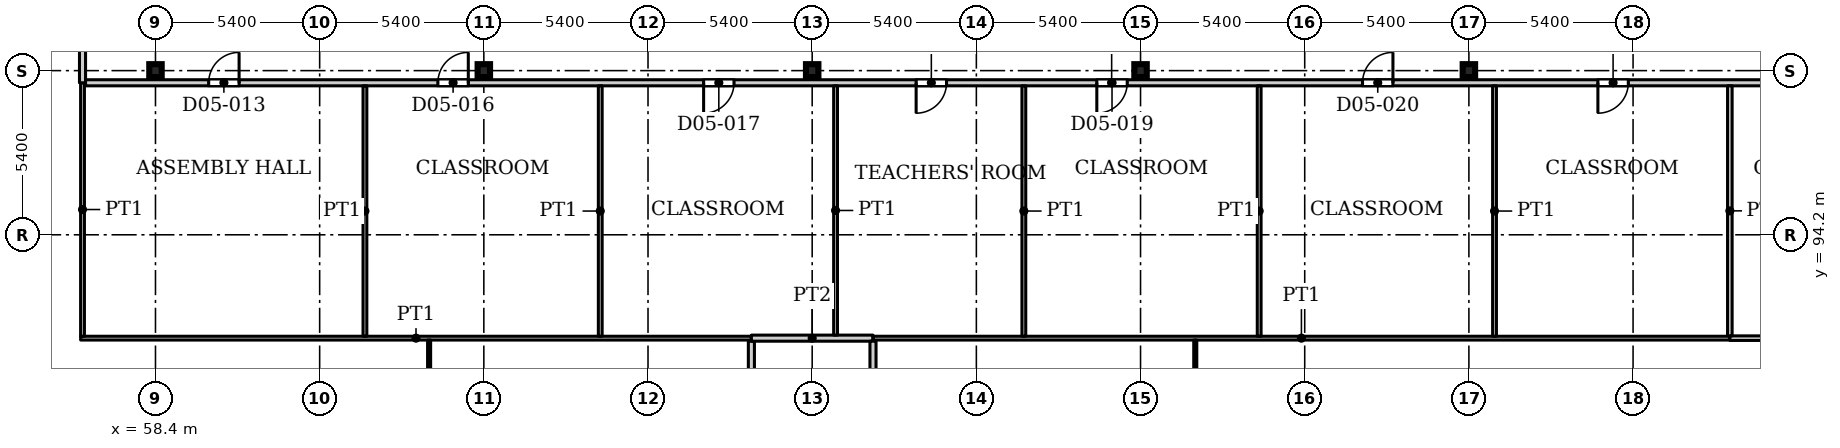
"""IFC4 building model, lengths in metres.
Left out: names, types, materials, properties, quantities, classifications, styles, units other than length and angle.
Written with IfcOpenShell. Run it as: python <this file> out.ifc"""

import sys

from ifc_helpers import new_model, si_unit, direction, frame, frame_2d, origin, origin_2d, place, context, subcontext, project, spatial, rectangle, i_section, extrude, source, transform, mapped, element, fill, save


model = new_model("IFC4")
c1 = context("Model", 3, precision=1e-05, world=origin(), true_north=direction((0.0, 1.0)))
c2 = subcontext(c1, "Body", "Model", "MODEL_VIEW")
j1 = project(units=[si_unit("LENGTHUNIT", "METRE"), si_unit("PLANEANGLEUNIT", "RADIAN")], contexts=[c1])
p1 = place(None, origin())
s1 = spatial("IfcSite", under=j1, at=p1, CompositionType="ELEMENT")
p2 = place(p1, origin())
s2 = spatial("IfcBuilding", under=s1, at=p2, CompositionType="ELEMENT")
p3 = place(p2, frame((0.0, 0.0, 26.0)))
s3 = spatial("IfcBuildingStorey", under=s2, at=p3, CompositionType="ELEMENT", Elevation=26.0)
for number, where, z_axis, x_axis in (
    (1, (58.4, 99.6, 0.0), (0.0, 0.0, 1.0), (1.0, 0.0, 0.0)),
    (2, (69.2, 99.6, 0.0), (0.0, 0.0, 1.0), (1.0, 0.0, 0.0)),
    (3, (80.0, 99.6, 0.0), (0.0, 0.0, 1.0), (1.0, 0.0, 0.0)),
    (4, (90.8, 99.6, 0.0), (0.0, 0.0, 1.0), (1.0, 0.0, 0.0)),
    (5, (101.6, 99.6, 0.0), (0.0, 0.0, 1.0), (1.0, 0.0, 0.0)),
):
    element("IfcColumn", number, at=place(p3, frame(where, z_axis=z_axis, x_axis=x_axis)), inside=s3, PredefinedType="COLUMN", context=c2, shape_type="SweptSolid", body=[
        extrude(i_section(OverallWidth=0.409, OverallDepth=0.425, WebThickness=0.033, FlangeThickness=0.052, FilletRadius=0.013, at=origin_2d()), origin(), (0.0, 0.0, 1.0), 4.5),
    ])
p4 = place(p3, frame((55.938, 90.8, 0.0), z_axis=(0.0, 0.0, 1.0), x_axis=(1.0, 0.0, 0.0)))
e6 = element("IfcWall", 6, at=p4, inside=s3, PredefinedType="PARTITIONING", context=c2, shape_type="SweptSolid", body=[
    extrude(rectangle(XDim=22.062, YDim=0.125, at=frame_2d((11.031, 0.0))), origin(), (0.0, 0.0, 1.0), 4.2),
])
p5 = place(p3, frame((56.0, 90.862, 0.0), z_axis=(0.0, 0.0, 1.0), x_axis=(0.0, 1.0, 0.0)))
e7 = element("IfcWall", 7, at=p5, inside=s3, PredefinedType="PARTITIONING", context=c2, shape_type="SweptSolid", body=[
    extrude(rectangle(XDim=8.338, YDim=0.125, at=frame_2d((4.169, 0.0))), origin(), (0.0, 0.0, 1.0), 4.2),
])
p6 = place(p3, frame((56.0, 99.2, 0.0), z_axis=(0.0, 0.0, 1.0), x_axis=(0.0, 1.0, 0.0)))
e8 = element("IfcWall", 8, at=p6, inside=s3, PredefinedType="PARTITIONING", context=c2, shape_type="SweptSolid", body=[
    extrude(rectangle(XDim=2.4, YDim=0.2, at=frame_2d((1.2, 0.0))), origin(), (0.0, 0.0, 1.0), 4.2),
])
p7 = place(p3, frame((56.1, 99.2, 0.0), z_axis=(0.0, 0.0, 1.0), x_axis=(1.0, 0.0, 0.0)))
e9 = element("IfcWall", 9, at=p7, inside=s3, PredefinedType="PARTITIONING", context=c2, shape_type="SweptSolid", body=[
    extrude(rectangle(XDim=67.5, YDim=0.2, at=frame_2d((33.75, 0.0))), origin(), (0.0, 0.0, 1.0), 4.2),
])
p8 = place(p7, frame((4.05, 0.0, 0.0)))
e10 = element("IfcOpeningElement", 10, at=p8, cuts=e9, PredefinedType="OPENING", context=c2, shape_type="SweptSolid", body=[
    extrude(rectangle(XDim=1.0, YDim=2.1, at=frame_2d((0.5, 1.05))), frame((0.0, 0.11, 0.0), z_axis=(0.0, -1.0, 0.0), x_axis=(1.0, 0.0, 0.0)), (0.0, 0.0, 1.0), 0.22),
])
p9 = place(p7, frame((65.554, 0.0, 0.0)))
e11 = element("IfcOpeningElement", 11, at=p9, cuts=e9, PredefinedType="OPENING", context=c2, shape_type="SweptSolid", body=[
    extrude(rectangle(XDim=1.0, YDim=2.1, at=frame_2d((0.5, 1.05))), frame((0.0, 0.11, 0.0), z_axis=(0.0, -1.0, 0.0), x_axis=(1.0, 0.0, 0.0)), (0.0, 0.0, 1.0), 0.22),
])
p10 = place(p7, frame((11.589, 0.0, 0.0)))
e12 = element("IfcOpeningElement", 12, at=p10, cuts=e9, PredefinedType="OPENING", context=c2, shape_type="SweptSolid", body=[
    extrude(rectangle(XDim=1.0, YDim=2.1, at=frame_2d((0.5, 1.05))), frame((0.0, 0.11, 0.0), z_axis=(0.0, -1.0, 0.0), x_axis=(1.0, 0.0, 0.0)), (0.0, 0.0, 1.0), 0.22),
])
p11 = place(p7, frame((20.329, 0.0, 0.0)))
e13 = element("IfcOpeningElement", 13, at=p11, cuts=e9, PredefinedType="OPENING", context=c2, shape_type="SweptSolid", body=[
    extrude(rectangle(XDim=1.0, YDim=2.1, at=frame_2d((0.5, 1.05))), frame((0.0, 0.11, 0.0), z_axis=(0.0, -1.0, 0.0), x_axis=(1.0, 0.0, 0.0)), (0.0, 0.0, 1.0), 0.22),
])
p12 = place(p7, frame((27.319, 0.0, 0.0)))
e14 = element("IfcOpeningElement", 14, at=p12, cuts=e9, PredefinedType="OPENING", context=c2, shape_type="SweptSolid", body=[
    extrude(rectangle(XDim=1.0, YDim=2.1, at=frame_2d((0.5, 1.05))), frame((0.0, 0.11, 0.0), z_axis=(0.0, -1.0, 0.0), x_axis=(1.0, 0.0, 0.0)), (0.0, 0.0, 1.0), 0.22),
])
p13 = place(p7, frame((33.262, 0.0, 0.0)))
e15 = element("IfcOpeningElement", 15, at=p13, cuts=e9, PredefinedType="OPENING", context=c2, shape_type="SweptSolid", body=[
    extrude(rectangle(XDim=1.0, YDim=2.1, at=frame_2d((0.5, 1.05))), frame((0.0, 0.11, 0.0), z_axis=(0.0, -1.0, 0.0), x_axis=(1.0, 0.0, 0.0)), (0.0, 0.0, 1.0), 0.22),
])
p14 = place(p7, frame((42.002, 0.0, 0.0)))
e16 = element("IfcOpeningElement", 16, at=p14, cuts=e9, PredefinedType="OPENING", context=c2, shape_type="SweptSolid", body=[
    extrude(rectangle(XDim=1.0, YDim=2.1, at=frame_2d((0.5, 1.05))), frame((0.0, 0.11, 0.0), z_axis=(0.0, -1.0, 0.0), x_axis=(1.0, 0.0, 0.0)), (0.0, 0.0, 1.0), 0.22),
])
p15 = place(p7, frame((49.743, 0.0, 0.0)))
e17 = element("IfcOpeningElement", 17, at=p15, cuts=e9, PredefinedType="OPENING", context=c2, shape_type="SweptSolid", body=[
    extrude(rectangle(XDim=1.0, YDim=2.1, at=frame_2d((0.5, 1.05))), frame((0.0, 0.11, 0.0), z_axis=(0.0, -1.0, 0.0), x_axis=(1.0, 0.0, 0.0)), (0.0, 0.0, 1.0), 0.22),
])
p16 = place(p7, frame((56.733, 0.0, 0.0)))
e18 = element("IfcOpeningElement", 18, at=p16, cuts=e9, PredefinedType="OPENING", context=c2, shape_type="SweptSolid", body=[
    extrude(rectangle(XDim=1.0, YDim=2.1, at=frame_2d((0.5, 1.05))), frame((0.0, 0.11, 0.0), z_axis=(0.0, -1.0, 0.0), x_axis=(1.0, 0.0, 0.0)), (0.0, 0.0, 1.0), 0.22),
])
p17 = place(p7, frame((61.394, 0.0, 0.0)))
e19 = element("IfcOpeningElement", 19, at=p17, cuts=e9, PredefinedType="OPENING", context=c2, shape_type="SweptSolid", body=[
    extrude(rectangle(XDim=1.0, YDim=2.1, at=frame_2d((0.5, 1.05))), frame((0.0, 0.11, 0.0), z_axis=(0.0, -1.0, 0.0), x_axis=(1.0, 0.0, 0.0)), (0.0, 0.0, 1.0), 0.22),
])
p18 = place(p3, frame((65.289, 90.862, 0.0), z_axis=(0.0, 0.0, 1.0), x_axis=(0.0, 1.0, 0.0)))
e20 = element("IfcWall", 20, at=p18, inside=s3, PredefinedType="PARTITIONING", context=c2, shape_type="SweptSolid", body=[
    extrude(rectangle(XDim=8.238, YDim=0.125, at=frame_2d((4.119, 0.0))), origin(), (0.0, 0.0, 1.0), 4.2),
])
p19 = place(p3, frame((67.4, 69.0, 0.0), z_axis=(0.0, 0.0, 1.0), x_axis=(0.0, 1.0, 0.0)))
e21 = element("IfcWall", 21, at=p19, inside=s3, PredefinedType="PARTITIONING", context=c2, shape_type="SweptSolid", body=[
    extrude(rectangle(XDim=21.738, YDim=0.1, at=frame_2d((10.869, 0.0))), origin(), (0.0, 0.0, 1.0), 4.2),
])
p20 = place(p3, frame((73.029, 90.862, 0.0), z_axis=(0.0, 0.0, 1.0), x_axis=(0.0, 1.0, 0.0)))
e22 = element("IfcWall", 22, at=p20, inside=s3, PredefinedType="PARTITIONING", context=c2, shape_type="SweptSolid", body=[
    extrude(rectangle(XDim=8.238, YDim=0.125, at=frame_2d((4.119, 0.0))), origin(), (0.0, 0.0, 1.0), 4.2),
])
p21 = place(p3, frame((78.0, 69.1, 0.0), z_axis=(0.0, 0.0, 1.0), x_axis=(0.0, 1.0, 0.0)))
e23 = element("IfcWall", 23, at=p21, inside=s3, PredefinedType="PARTITIONING", context=c2, shape_type="SweptSolid", body=[
    extrude(rectangle(XDim=21.6, YDim=0.2, at=frame_2d((10.8, 0.0))), origin(), (0.0, 0.0, 1.0), 4.2),
])
p22 = place(p3, frame((78.0, 90.8, 0.0), z_axis=(0.0, 0.0, 1.0), x_axis=(1.0, 0.0, 0.0)))
e24 = element("IfcWall", 24, at=p22, inside=s3, PredefinedType="PARTITIONING", context=c2, shape_type="SweptSolid", body=[
    extrude(rectangle(XDim=4.0, YDim=0.2, at=frame_2d((2.0, 0.0))), origin(), (0.0, 0.0, 1.0), 4.2),
])
p23 = place(p3, frame((80.769, 90.9, 0.0), z_axis=(0.0, 0.0, 1.0), x_axis=(0.0, 1.0, 0.0)))
e25 = element("IfcWall", 25, at=p23, inside=s3, PredefinedType="PARTITIONING", context=c2, shape_type="SweptSolid", body=[
    extrude(rectangle(XDim=8.2, YDim=0.125, at=frame_2d((4.1, 0.0))), origin(), (0.0, 0.0, 1.0), 4.2),
])
p24 = place(p3, frame((82.0, 69.1, 0.0), z_axis=(0.0, 0.0, 1.0), x_axis=(0.0, 1.0, 0.0)))
e26 = element("IfcWall", 26, at=p24, inside=s3, PredefinedType="PARTITIONING", context=c2, shape_type="SweptSolid", body=[
    extrude(rectangle(XDim=21.6, YDim=0.2, at=frame_2d((10.8, 0.0))), origin(), (0.0, 0.0, 1.0), 4.2),
])
p25 = place(p3, frame((82.0, 90.8, 0.0), z_axis=(0.0, 0.0, 1.0), x_axis=(1.0, 0.0, 0.0)))
e27 = element("IfcWall", 27, at=p25, inside=s3, PredefinedType="PARTITIONING", context=c2, shape_type="SweptSolid", body=[
    extrude(rectangle(XDim=28.183, YDim=0.125, at=frame_2d((14.092, 0.0))), origin(), (0.0, 0.0, 1.0), 4.2),
])
p26 = place(p3, frame((86.962, 90.862, 0.0), z_axis=(0.0, 0.0, 1.0), x_axis=(0.0, 1.0, 0.0)))
e28 = element("IfcWall", 28, at=p26, inside=s3, PredefinedType="PARTITIONING", context=c2, shape_type="SweptSolid", body=[
    extrude(rectangle(XDim=8.238, YDim=0.125, at=frame_2d((4.119, 0.0))), origin(), (0.0, 0.0, 1.0), 4.2),
])
p27 = place(p3, frame((92.6, 69.0, 0.0), z_axis=(0.0, 0.0, 1.0), x_axis=(0.0, 1.0, 0.0)))
e29 = element("IfcWall", 29, at=p27, inside=s3, PredefinedType="PARTITIONING", context=c2, shape_type="SweptSolid", body=[
    extrude(rectangle(XDim=21.738, YDim=0.1, at=frame_2d((10.869, 0.0))), origin(), (0.0, 0.0, 1.0), 4.2),
])
for number, where, z_axis, x_axis in (
    (30, (94.702, 90.862, 0.0), (0.0, 0.0, 1.0), (0.0, 1.0, 0.0)),
    (31, (102.443, 90.862, 0.0), (0.0, 0.0, 1.0), (0.0, 1.0, 0.0)),
):
    element("IfcWall", number, at=place(p3, frame(where, z_axis=z_axis, x_axis=x_axis)), inside=s3, PredefinedType="PARTITIONING", context=c2, shape_type="SweptSolid", body=[
        extrude(rectangle(XDim=8.238, YDim=0.125, at=frame_2d((4.119, 0.0))), origin(), (0.0, 0.0, 1.0), 4.2),
    ])
p28 = place(p3, frame((110.183, 90.8, 0.0), z_axis=(0.0, 0.0, 1.0), x_axis=(1.0, 0.0, 0.0)))
e32 = element("IfcWall", 32, at=p28, inside=s3, PredefinedType="PARTITIONING", context=c2, shape_type="SweptSolid", body=[
    extrude(rectangle(XDim=10.321, YDim=0.15, at=frame_2d((5.16, 0.0))), origin(), (0.0, 0.0, 1.0), 4.2),
])
p29 = place(p3, frame((110.183, 90.875, 0.0), z_axis=(0.0, 0.0, 1.0), x_axis=(0.0, 1.0, 0.0)))
e33 = element("IfcWall", 33, at=p29, inside=s3, PredefinedType="PARTITIONING", context=c2, shape_type="SweptSolid", body=[
    extrude(rectangle(XDim=8.225, YDim=0.15, at=frame_2d((4.113, 0.0))), origin(), (0.0, 0.0, 1.0), 4.2),
])
m1 = source(origin(), c2, "Body", "SweptSolid", [
    extrude(rectangle(XDim=1.0, YDim=2.1, at=frame_2d((0.5, 1.05))), frame((0.0, 0.025, 0.0), z_axis=(0.0, -1.0, 0.0), x_axis=(1.0, 0.0, 0.0)), (0.0, 0.0, 1.0), 0.05),
])
p30 = place(p8, origin())
e34 = element("IfcDoor", 34, at=p30, inside=s3, OperationType="SINGLE_SWING_LEFT", PredefinedType="DOOR", context=c2, shape_type="MappedRepresentation", body=[
    mapped(m1, transform((0.0, 0.0, 0.0), x_axis=(1.0, 0.0, 0.0), y_axis=(0.0, 1.0, 0.0), z_axis=(0.0, 0.0, 1.0), scale=1.0)),
])
fill(e10, e34)
p31 = place(p10, origin())
e35 = element("IfcDoor", 35, at=p31, inside=s3, OperationType="SINGLE_SWING_LEFT", PredefinedType="DOOR", context=c2, shape_type="MappedRepresentation", body=[
    mapped(m1, transform((0.0, 0.0, 0.0), x_axis=(1.0, 0.0, 0.0), y_axis=(0.0, 1.0, 0.0), z_axis=(0.0, 0.0, 1.0), scale=1.0)),
])
fill(e12, e35)
p32 = place(p11, origin())
e36 = element("IfcDoor", 36, at=p32, inside=s3, OperationType="SINGLE_SWING_RIGHT", PredefinedType="DOOR", context=c2, shape_type="MappedRepresentation", body=[
    mapped(m1, transform((0.0, 0.0, 0.0), x_axis=(1.0, 0.0, 0.0), y_axis=(0.0, 1.0, 0.0), z_axis=(0.0, 0.0, 1.0), scale=1.0)),
])
fill(e13, e36)
p33 = place(p12, origin())
e37 = element("IfcDoor", 37, at=p33, inside=s3, OperationType="SINGLE_SWING_RIGHT", PredefinedType="DOOR", context=c2, shape_type="MappedRepresentation", body=[
    mapped(m1, transform((0.0, 0.0, 0.0), x_axis=(1.0, 0.0, 0.0), y_axis=(0.0, 1.0, 0.0), z_axis=(0.0, 0.0, 1.0), scale=1.0)),
])
fill(e14, e37)
p34 = place(p13, origin())
e38 = element("IfcDoor", 38, at=p34, inside=s3, OperationType="SINGLE_SWING_RIGHT", PredefinedType="DOOR", context=c2, shape_type="MappedRepresentation", body=[
    mapped(m1, transform((0.0, 0.0, 0.0), x_axis=(1.0, 0.0, 0.0), y_axis=(0.0, 1.0, 0.0), z_axis=(0.0, 0.0, 1.0), scale=1.0)),
])
fill(e15, e38)
p35 = place(p14, origin())
e39 = element("IfcDoor", 39, at=p35, inside=s3, OperationType="SINGLE_SWING_LEFT", PredefinedType="DOOR", context=c2, shape_type="MappedRepresentation", body=[
    mapped(m1, transform((0.0, 0.0, 0.0), x_axis=(1.0, 0.0, 0.0), y_axis=(0.0, 1.0, 0.0), z_axis=(0.0, 0.0, 1.0), scale=1.0)),
])
fill(e16, e39)
p36 = place(p15, origin())
e40 = element("IfcDoor", 40, at=p36, inside=s3, OperationType="SINGLE_SWING_RIGHT", PredefinedType="DOOR", context=c2, shape_type="MappedRepresentation", body=[
    mapped(m1, transform((0.0, 0.0, 0.0), x_axis=(1.0, 0.0, 0.0), y_axis=(0.0, 1.0, 0.0), z_axis=(0.0, 0.0, 1.0), scale=1.0)),
])
fill(e17, e40)
save(model, sys.argv[1])
